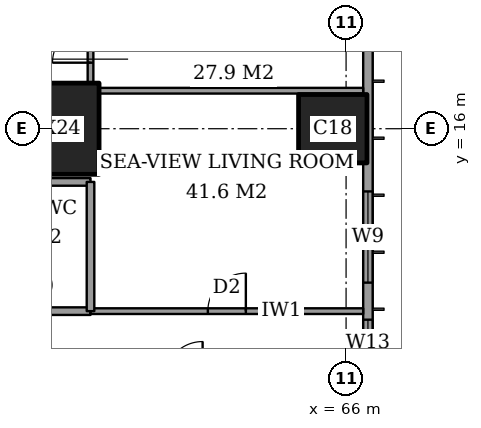
"""IFC4 building model, lengths in metres.
Left out: names, types, materials, properties, quantities, classifications, styles, units other than length and angle.
Written with IfcOpenShell. Run it as: python <this file> out.ifc"""

import sys

from ifc_helpers import new_model, si_unit, direction, frame, frame_2d, origin, origin_2d, place, context, subcontext, project, spatial, rectangle, extrude, element, fill, save


model = new_model("IFC4")
c1 = context("Model", 3, precision=1e-05, world=origin(), true_north=direction((0.0, 1.0)))
c2 = subcontext(c1, "Body", "Model", "MODEL_VIEW")
j1 = project(units=[si_unit("LENGTHUNIT", "METRE"), si_unit("PLANEANGLEUNIT", "RADIAN")], contexts=[c1])
p1 = place(None, origin())
s1 = spatial("IfcSite", under=j1, at=p1, CompositionType="ELEMENT")
p2 = place(p1, origin())
s2 = spatial("IfcBuilding", under=s1, at=p2, CompositionType="ELEMENT")
p3 = place(p2, frame((0.0, 0.0, 182.2)))
s3 = spatial("IfcBuildingStorey", under=s2, at=p3, CompositionType="ELEMENT", Elevation=182.2)
p4 = place(p3, frame((58.0, 16.0, 0.0), z_axis=(0.0, 0.0, 1.0), x_axis=(1.0, 0.0, 0.0)))
e1 = element("IfcColumn", 1, at=p4, inside=s3, PredefinedType="COLUMN", context=c2, shape_type="SweptSolid", body=[
    extrude(rectangle(XDim=3.0, YDim=2.4, at=origin_2d()), origin(), (0.0, 0.0, 1.0), 3.6),
])
p5 = place(p3, frame((65.65, 16.0, 0.0), z_axis=(0.0, 0.0, 1.0), x_axis=(1.0, 0.0, 0.0)))
e2 = element("IfcColumn", 2, at=p5, inside=s3, PredefinedType="COLUMN", context=c2, shape_type="SweptSolid", body=[
    extrude(rectangle(XDim=1.8, YDim=1.8, at=origin_2d()), origin(), (0.0, 0.0, 1.0), 3.6),
])
p6 = place(p3, frame((66.575, 3.175, 0.0), z_axis=(0.0, 0.0, 1.0), x_axis=(0.0, 1.0, 0.0)))
e3 = element("IfcWall", 3, at=p6, inside=s3, PredefinedType="SOLIDWALL", context=c2, shape_type="SweptSolid", body=[
    extrude(rectangle(XDim=41.65, YDim=0.25, at=frame_2d((20.825, 0.0))), origin(), (0.0, 0.0, 1.0), 3.6),
])
p7 = place(p6, frame((0.825, 0.0, 0.2)))
e4 = element("IfcOpeningElement", 4, at=p7, cuts=e3, PredefinedType="OPENING", context=c2, shape_type="SweptSolid", body=[
    extrude(rectangle(XDim=2.4, YDim=2.4, at=frame_2d((1.2, 1.2))), frame((0.0, 0.135, 0.0), z_axis=(0.0, -1.0, 0.0), x_axis=(1.0, 0.0, 0.0)), (0.0, 0.0, 1.0), 0.27),
])
p8 = place(p6, frame((6.6, 0.0, 0.2)))
e5 = element("IfcOpeningElement", 5, at=p8, cuts=e3, PredefinedType="OPENING", context=c2, shape_type="SweptSolid", body=[
    extrude(rectangle(XDim=1.2, YDim=2.4, at=frame_2d((0.6, 1.2))), frame((0.0, 0.135, 0.0), z_axis=(0.0, -1.0, 0.0), x_axis=(1.0, 0.0, 0.0)), (0.0, 0.0, 1.0), 0.27),
])
p9 = place(p6, frame((8.775, 0.0, 0.2)))
e6 = element("IfcOpeningElement", 6, at=p9, cuts=e3, PredefinedType="OPENING", context=c2, shape_type="SweptSolid", body=[
    extrude(rectangle(XDim=2.4, YDim=2.4, at=frame_2d((1.2, 1.2))), frame((0.0, 0.135, 0.0), z_axis=(0.0, -1.0, 0.0), x_axis=(1.0, 0.0, 0.0)), (0.0, 0.0, 1.0), 0.27),
])
p10 = place(p6, frame((15.675, 0.0, 0.2)))
e7 = element("IfcOpeningElement", 7, at=p10, cuts=e3, PredefinedType="OPENING", context=c2, shape_type="SweptSolid", body=[
    extrude(rectangle(XDim=2.4, YDim=2.4, at=frame_2d((1.2, 1.2))), frame((0.0, 0.135, 0.0), z_axis=(0.0, -1.0, 0.0), x_axis=(1.0, 0.0, 0.0)), (0.0, 0.0, 1.0), 0.27),
])
p11 = place(p6, frame((23.575, 0.0, 0.2)))
e8 = element("IfcOpeningElement", 8, at=p11, cuts=e3, PredefinedType="OPENING", context=c2, shape_type="SweptSolid", body=[
    extrude(rectangle(XDim=2.4, YDim=2.4, at=frame_2d((1.2, 1.2))), frame((0.0, 0.135, 0.0), z_axis=(0.0, -1.0, 0.0), x_axis=(1.0, 0.0, 0.0)), (0.0, 0.0, 1.0), 0.27),
])
p12 = place(p6, frame((30.775, 0.0, 0.2)))
e9 = element("IfcOpeningElement", 9, at=p12, cuts=e3, PredefinedType="OPENING", context=c2, shape_type="SweptSolid", body=[
    extrude(rectangle(XDim=2.4, YDim=2.4, at=frame_2d((1.2, 1.2))), frame((0.0, 0.135, 0.0), z_axis=(0.0, -1.0, 0.0), x_axis=(1.0, 0.0, 0.0)), (0.0, 0.0, 1.0), 0.27),
])
p13 = place(p6, frame((34.55, 0.0, 0.2)))
e10 = element("IfcOpeningElement", 10, at=p13, cuts=e3, PredefinedType="OPENING", context=c2, shape_type="SweptSolid", body=[
    extrude(rectangle(XDim=1.2, YDim=2.4, at=frame_2d((0.6, 1.2))), frame((0.0, 0.135, 0.0), z_axis=(0.0, -1.0, 0.0), x_axis=(1.0, 0.0, 0.0)), (0.0, 0.0, 1.0), 0.27),
])
p14 = place(p6, frame((38.425, 0.0, 0.2)))
e11 = element("IfcOpeningElement", 11, at=p14, cuts=e3, PredefinedType="OPENING", context=c2, shape_type="SweptSolid", body=[
    extrude(rectangle(XDim=2.4, YDim=2.4, at=frame_2d((1.2, 1.2))), frame((0.0, 0.135, 0.0), z_axis=(0.0, -1.0, 0.0), x_axis=(1.0, 0.0, 0.0)), (0.0, 0.0, 1.0), 0.27),
])
p15 = place(p3, frame((55.6, 11.2, 0.0), z_axis=(0.0, 0.0, 1.0), x_axis=(1.0, 0.0, 0.0)))
e12 = element("IfcWall", 12, at=p15, inside=s3, PredefinedType="PARTITIONING", context=c2, shape_type="SweptSolid", body=[
    extrude(rectangle(XDim=3.675, YDim=0.2, at=frame_2d((1.837, 0.0))), origin(), (0.0, 0.0, 1.0), 3.35),
])
p16 = place(p15, frame((1.387, 0.0, 0.0)))
e13 = element("IfcOpeningElement", 13, at=p16, cuts=e12, PredefinedType="OPENING", context=c2, shape_type="SweptSolid", body=[
    extrude(rectangle(XDim=0.9, YDim=2.1, at=frame_2d((0.45, 1.05))), frame((0.0, 0.11, 0.0), z_axis=(0.0, -1.0, 0.0), x_axis=(1.0, 0.0, 0.0)), (0.0, 0.0, 1.0), 0.22),
])
p17 = place(p3, frame((59.275, 11.2, 0.0), z_axis=(0.0, 0.0, 1.0), x_axis=(1.0, 0.0, 0.0)))
e14 = element("IfcWall", 14, at=p17, inside=s3, PredefinedType="PARTITIONING", context=c2, shape_type="SweptSolid", body=[
    extrude(rectangle(XDim=7.175, YDim=0.15, at=frame_2d((3.587, 0.0))), origin(), (0.0, 0.0, 1.0), 3.35),
])
p18 = place(p17, frame((3.087, 0.0, 0.0)))
e15 = element("IfcOpeningElement", 15, at=p18, cuts=e14, PredefinedType="OPENING", context=c2, shape_type="SweptSolid", body=[
    extrude(rectangle(XDim=1.0, YDim=2.1, at=frame_2d((0.5, 1.05))), frame((0.0, 0.085, 0.0), z_axis=(0.0, -1.0, 0.0), x_axis=(1.0, 0.0, 0.0)), (0.0, 0.0, 1.0), 0.17),
])
p19 = place(p3, frame((55.6, 14.6, 0.0), z_axis=(0.0, 0.0, 1.0), x_axis=(1.0, 0.0, 0.0)))
e16 = element("IfcWall", 16, at=p19, inside=s3, PredefinedType="PARTITIONING", context=c2, shape_type="SweptSolid", body=[
    extrude(rectangle(XDim=3.675, YDim=0.2, at=frame_2d((1.837, 0.0))), origin(), (0.0, 0.0, 1.0), 3.35),
])
p20 = place(p3, frame((59.5, 17.0, 0.0), z_axis=(0.0, 0.0, 1.0), x_axis=(1.0, 0.0, 0.0)))
e17 = element("IfcWall", 17, at=p20, inside=s3, PredefinedType="PARTITIONING", context=c2, shape_type="SweptSolid", body=[
    extrude(rectangle(XDim=6.95, YDim=0.15, at=frame_2d((3.475, 0.0))), origin(), (0.0, 0.0, 1.0), 3.35),
])
p21 = place(p3, frame((59.275, 11.2, 0.0), z_axis=(0.0, 0.0, 1.0), x_axis=(0.0, 1.0, 0.0)))
e18 = element("IfcWall", 18, at=p21, inside=s3, PredefinedType="PARTITIONING", context=c2, shape_type="SweptSolid", body=[
    extrude(rectangle(XDim=3.4, YDim=0.2, at=frame_2d((1.7, 0.0))), origin(), (0.0, 0.0, 1.0), 3.35),
])
p22 = place(p3, frame((59.275, 17.2, 0.0), z_axis=(0.0, 0.0, 1.0), x_axis=(0.0, 1.0, 0.0)))
e19 = element("IfcWall", 19, at=p22, inside=s3, PredefinedType="PARTITIONING", context=c2, shape_type="SweptSolid", body=[
    extrude(rectangle(XDim=2.45, YDim=0.15, at=frame_2d((1.225, 0.0))), origin(), (0.0, 0.0, 1.0), 3.35),
])
p23 = place(p22, frame((0.538, 0.0, 0.0)))
e20 = element("IfcOpeningElement", 20, at=p23, cuts=e19, PredefinedType="OPENING", context=c2, shape_type="SweptSolid", body=[
    extrude(rectangle(XDim=1.0, YDim=2.1, at=frame_2d((0.5, 1.05))), frame((0.0, 0.085, 0.0), z_axis=(0.0, -1.0, 0.0), x_axis=(1.0, 0.0, 0.0)), (0.0, 0.0, 1.0), 0.17),
])
p24 = place(p8, origin())
e21 = element("IfcWindow", 21, at=p24, inside=s3, PartitioningType="SINGLE_PANEL", PredefinedType="WINDOW", context=c2, shape_type="SweptSolid", body=[
    extrude(rectangle(XDim=1.2, YDim=2.4, at=frame_2d((0.6, 1.2))), frame((0.0, 0.03, 0.0), z_axis=(0.0, -1.0, 0.0), x_axis=(1.0, 0.0, 0.0)), (0.0, 0.0, 1.0), 0.06),
])
fill(e5, e21)
p25 = place(p9, origin())
e22 = element("IfcWindow", 22, at=p25, inside=s3, PartitioningType="SINGLE_PANEL", PredefinedType="WINDOW", context=c2, shape_type="SweptSolid", body=[
    extrude(rectangle(XDim=2.4, YDim=2.4, at=frame_2d((1.2, 1.2))), frame((0.0, 0.03, 0.0), z_axis=(0.0, -1.0, 0.0), x_axis=(1.0, 0.0, 0.0)), (0.0, 0.0, 1.0), 0.06),
])
fill(e6, e22)
p26 = place(p18, origin())
e23 = element("IfcDoor", 23, at=p26, inside=s3, OperationType="SINGLE_SWING_LEFT", PredefinedType="DOOR", context=c2, shape_type="SweptSolid", body=[
    extrude(rectangle(XDim=1.0, YDim=2.1, at=frame_2d((0.5, 1.05))), frame((0.0, 0.025, 0.0), z_axis=(0.0, -1.0, 0.0), x_axis=(1.0, 0.0, 0.0)), (0.0, 0.0, 1.0), 0.05),
])
fill(e15, e23)
p27 = place(p23, origin())
e24 = element("IfcDoor", 24, at=p27, inside=s3, OperationType="SINGLE_SWING_RIGHT", PredefinedType="DOOR", context=c2, shape_type="SweptSolid", body=[
    extrude(rectangle(XDim=1.0, YDim=2.1, at=frame_2d((0.5, 1.05))), frame((0.0, 0.025, 0.0), z_axis=(0.0, -1.0, 0.0), x_axis=(1.0, 0.0, 0.0)), (0.0, 0.0, 1.0), 0.05),
])
fill(e20, e24)
save(model, sys.argv[1])
